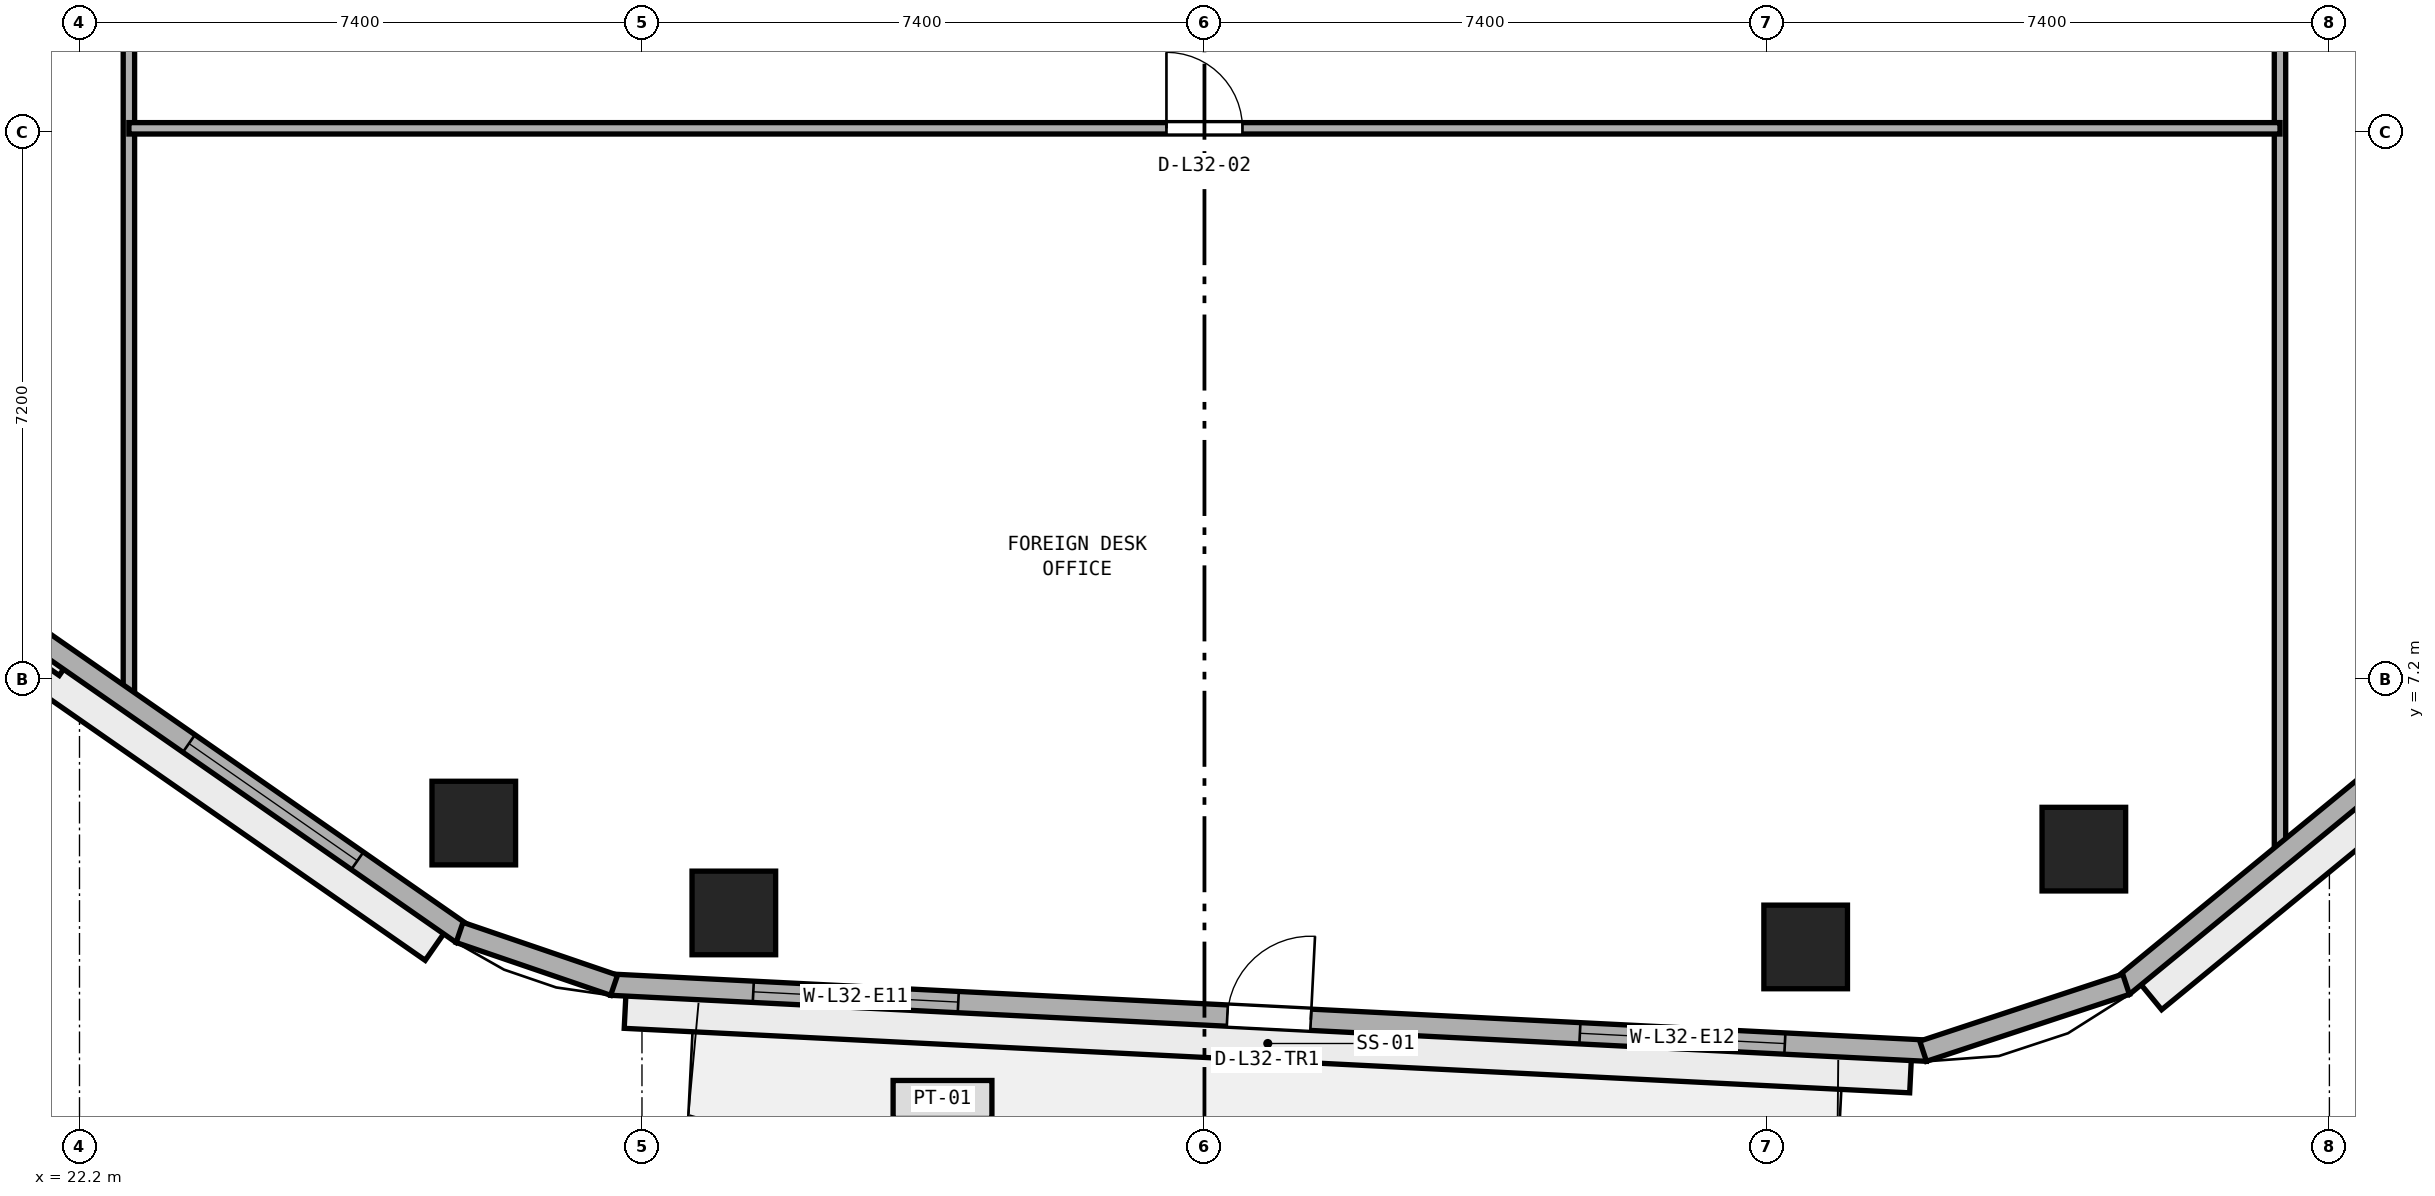
"""IFC4 building model, lengths in metres.
Left out: names, types, materials, properties, quantities, classifications, styles, units other than length and angle.
Written with IfcOpenShell. Run it as: python <this file> out.ifc"""

import sys

from ifc_helpers import new_model, si_unit, direction, frame, frame_2d, origin, origin_2d, place, context, subcontext, project, spatial, rectangle, extrude, element, fill, save


model = new_model("IFC4")
c1 = context("Model", 3, precision=1e-05, world=origin(), true_north=direction((0.0, 1.0)))
c2 = subcontext(c1, "Body", "Model", "MODEL_VIEW")
j1 = project(units=[si_unit("LENGTHUNIT", "METRE"), si_unit("PLANEANGLEUNIT", "RADIAN")], contexts=[c1])
p1 = place(None, origin())
s1 = spatial("IfcSite", under=j1, at=p1, CompositionType="ELEMENT")
p2 = place(p1, origin())
s2 = spatial("IfcBuilding", under=s1, at=p2, CompositionType="ELEMENT")
p3 = place(p2, frame((0.0, 0.0, 128.8)))
s3 = spatial("IfcBuildingStorey", under=s2, at=p3, CompositionType="ELEMENT", Elevation=128.8)
for number, where, z_axis, x_axis in (
    (1, (30.809, 4.127, 0.0), (0.0, 0.0, 1.0), (1.0, 0.0, 0.0)),
    (2, (44.91, 3.68, 0.0), (0.0, 0.0, 1.0), (1.0, 0.0, 0.0)),
    (3, (48.57, 4.967, 0.0), (0.0, 0.0, 1.0), (1.0, 0.0, 0.0)),
    (4, (27.387, 5.31, 0.0), (0.0, 0.0, 1.0), (1.0, 0.0, 0.0)),
):
    element("IfcColumn", number, at=place(p3, frame(where, z_axis=z_axis, x_axis=x_axis)), inside=s3, PredefinedType="COLUMN", context=c2, shape_type="SweptSolid", body=[
        extrude(rectangle(XDim=1.1, YDim=1.1, at=origin_2d()), origin(), (0.0, 0.0, 1.0), 3.8),
    ])
p4 = place(p3, frame((51.15, 4.823, 0.0), z_axis=(0.0, 0.0, 1.0), x_axis=(0.0, 1.0, 0.0)))
e5 = element("IfcWall", 5, at=p4, inside=s3, PredefinedType="PARTITIONING", context=c2, shape_type="SweptSolid", body=[
    extrude(rectangle(XDim=17.978, YDim=0.15, at=frame_2d((8.989, 0.0))), origin(), (0.0, 0.0, 1.0), 3.54),
])
p5 = place(p4, frame((12.952, 0.0, 0.0)))
e6 = element("IfcOpeningElement", 6, at=p5, cuts=e5, PredefinedType="OPENING", context=c2, shape_type="SweptSolid", body=[
    extrude(rectangle(XDim=0.9, YDim=2.1, at=frame_2d((0.45, 1.05))), frame((0.0, 0.085, 0.0), z_axis=(0.0, -1.0, 0.0), x_axis=(1.0, 0.0, 0.0)), (0.0, 0.0, 1.0), 0.17),
])
p6 = place(p3, frame((22.85, 6.875, 0.0), z_axis=(0.0, 0.0, 1.0), x_axis=(0.0, 1.0, 0.0)))
e7 = element("IfcWall", 7, at=p6, inside=s3, PredefinedType="PARTITIONING", context=c2, shape_type="SweptSolid", body=[
    extrude(rectangle(XDim=16.975, YDim=0.15, at=frame_2d((8.487, 0.0))), origin(), (0.0, 0.0, 1.0), 3.54),
])
p7 = place(p6, frame((10.199, 0.0, 0.0)))
e8 = element("IfcOpeningElement", 8, at=p7, cuts=e7, PredefinedType="OPENING", context=c2, shape_type="SweptSolid", body=[
    extrude(rectangle(XDim=1.0, YDim=2.12, at=frame_2d((0.5, 1.06))), frame((0.0, 0.085, 0.0), z_axis=(0.0, -1.0, 0.0), x_axis=(1.0, 0.0, 0.0)), (0.0, 0.0, 1.0), 0.17),
])
p8 = place(p3, frame((22.85, 14.45, 0.0), z_axis=(0.0, 0.0, 1.0), x_axis=(1.0, 0.0, 0.0)))
e9 = element("IfcWall", 9, at=p8, inside=s3, PredefinedType="PARTITIONING", context=c2, shape_type="SweptSolid", body=[
    extrude(rectangle(XDim=28.3, YDim=0.15, at=frame_2d((14.15, 0.0))), origin(), (0.0, 0.0, 1.0), 3.54),
])
p9 = place(p8, frame((13.65, 0.0, 0.0)))
e10 = element("IfcOpeningElement", 10, at=p9, cuts=e9, PredefinedType="OPENING", context=c2, shape_type="SweptSolid", body=[
    extrude(rectangle(XDim=1.0, YDim=2.12, at=frame_2d((0.5, 1.06))), frame((0.0, 0.085, 0.0), z_axis=(0.0, -1.0, 0.0), x_axis=(1.0, 0.0, 0.0)), (0.0, 0.0, 1.0), 0.17),
])
p10 = place(p3, frame((29.195, 3.184, 0.0), z_axis=(0.0, 0.0, 1.0), x_axis=(0.998743400978, -0.05011605535, 0.0)))
e11 = element("IfcWall", 11, at=p10, inside=s3, PredefinedType="STANDARD", context=c2, shape_type="SweptSolid", body=[
    extrude(rectangle(XDim=17.333, YDim=0.28, at=frame_2d((8.667, 0.0))), origin(), (0.0, 0.0, 1.0), 3.54),
])
p11 = place(p10, frame((8.116, 0.0, 0.0)))
e12 = element("IfcOpeningElement", 12, at=p11, cuts=e11, PredefinedType="OPENING", context=c2, shape_type="SweptSolid", body=[
    extrude(rectangle(XDim=1.1, YDim=2.2, at=frame_2d((0.55, 1.1))), frame((0.0, 0.15, 0.0), z_axis=(0.0, -1.0, 0.0), x_axis=(1.0, 0.0, 0.0)), (0.0, 0.0, 1.0), 0.3),
])
p12 = place(p10, frame((1.872, 0.0, 0.9)))
e13 = element("IfcOpeningElement", 13, at=p12, cuts=e11, PredefinedType="OPENING", context=c2, shape_type="SweptSolid", body=[
    extrude(rectangle(XDim=2.7, YDim=1.75, at=frame_2d((1.35, 0.875))), frame((0.0, 0.15, 0.0), z_axis=(0.0, -1.0, 0.0), x_axis=(1.0, 0.0, 0.0)), (0.0, 0.0, 1.0), 0.3),
])
p13 = place(p10, frame((12.76, 0.0, 0.9)))
e14 = element("IfcOpeningElement", 14, at=p13, cuts=e11, PredefinedType="OPENING", context=c2, shape_type="SweptSolid", body=[
    extrude(rectangle(XDim=2.7, YDim=1.75, at=frame_2d((1.35, 0.875))), frame((0.0, 0.15, 0.0), z_axis=(0.0, -1.0, 0.0), x_axis=(1.0, 0.0, 0.0)), (0.0, 0.0, 1.0), 0.3),
])
p14 = place(p3, frame((49.08, 3.164, 0.0), z_axis=(0.0, 0.0, 1.0), x_axis=(0.772937830186, 0.634481765433, 0.0)))
e15 = element("IfcWall", 15, at=p14, inside=s3, PredefinedType="STANDARD", context=c2, shape_type="SweptSolid", body=[
    extrude(rectangle(XDim=16.309, YDim=0.28, at=frame_2d((8.154, 0.0))), origin(), (0.0, 0.0, 1.0), 3.54),
])
p15 = place(p14, frame((6.804, 0.0, 0.9)))
e16 = element("IfcOpeningElement", 16, at=p15, cuts=e15, PredefinedType="OPENING", context=c2, shape_type="SweptSolid", body=[
    extrude(rectangle(XDim=2.7, YDim=1.75, at=frame_2d((1.35, 0.875))), frame((0.0, 0.15, 0.0), z_axis=(0.0, -1.0, 0.0), x_axis=(1.0, 0.0, 0.0)), (0.0, 0.0, 1.0), 0.3),
])
p16 = place(p14, frame((11.907, 0.0, 0.9)))
e17 = element("IfcOpeningElement", 17, at=p16, cuts=e15, PredefinedType="OPENING", context=c2, shape_type="SweptSolid", body=[
    extrude(rectangle(XDim=2.7, YDim=1.75, at=frame_2d((1.35, 0.875))), frame((0.0, 0.15, 0.0), z_axis=(0.0, -1.0, 0.0), x_axis=(1.0, 0.0, 0.0)), (0.0, 0.0, 1.0), 0.3),
])
p17 = place(p3, frame((13.952, 13.101, 0.0), z_axis=(0.0, 0.0, 1.0), x_axis=(0.820698239491, -0.571361881558, 0.0)))
e18 = element("IfcWall", 18, at=p17, inside=s3, PredefinedType="STANDARD", context=c2, shape_type="SweptSolid", body=[
    extrude(rectangle(XDim=16.186, YDim=0.28, at=frame_2d((8.093, 0.0))), origin(), (0.0, 0.0, 1.0), 3.54),
])
p18 = place(p17, frame((1.681, 0.0, 0.9)))
e19 = element("IfcOpeningElement", 19, at=p18, cuts=e18, PredefinedType="OPENING", context=c2, shape_type="SweptSolid", body=[
    extrude(rectangle(XDim=2.7, YDim=1.75, at=frame_2d((1.35, 0.875))), frame((0.0, 0.15, 0.0), z_axis=(0.0, -1.0, 0.0), x_axis=(1.0, 0.0, 0.0)), (0.0, 0.0, 1.0), 0.3),
])
p19 = place(p17, frame((6.743, 0.0, 0.9)))
e20 = element("IfcOpeningElement", 20, at=p19, cuts=e18, PredefinedType="OPENING", context=c2, shape_type="SweptSolid", body=[
    extrude(rectangle(XDim=2.7, YDim=1.75, at=frame_2d((1.35, 0.875))), frame((0.0, 0.15, 0.0), z_axis=(0.0, -1.0, 0.0), x_axis=(1.0, 0.0, 0.0)), (0.0, 0.0, 1.0), 0.3),
])
p20 = place(p17, frame((11.804, 0.0, 0.9)))
e21 = element("IfcOpeningElement", 21, at=p20, cuts=e18, PredefinedType="OPENING", context=c2, shape_type="SweptSolid", body=[
    extrude(rectangle(XDim=2.7, YDim=1.75, at=frame_2d((1.35, 0.875))), frame((0.0, 0.15, 0.0), z_axis=(0.0, -1.0, 0.0), x_axis=(1.0, 0.0, 0.0)), (0.0, 0.0, 1.0), 0.3),
])
p21 = place(p3, frame((46.455, 2.309, 0.0), z_axis=(0.0, 0.0, 1.0), x_axis=(0.949677222099, 0.313230224955, 0.0)))
e22 = element("IfcWall", 22, at=p21, inside=s3, PredefinedType="STANDARD", context=c2, shape_type="SweptSolid", body=[
    extrude(rectangle(XDim=2.811, YDim=0.28, at=frame_2d((1.406, 0.0))), origin(), (0.0, 0.0, 1.0), 3.54),
])
p22 = place(p3, frame((27.2, 3.871, 0.0), z_axis=(0.0, 0.0, 1.0), x_axis=(0.946327814955, -0.323208395068, 0.0)))
e23 = element("IfcWall", 23, at=p22, inside=s3, PredefinedType="STANDARD", context=c2, shape_type="SweptSolid", body=[
    extrude(rectangle(XDim=2.148, YDim=0.28, at=frame_2d((1.074, 0.0))), origin(), (0.0, 0.0, 1.0), 3.54),
])
p23 = place(p9, origin())
e24 = element("IfcDoor", 24, at=p23, inside=s3, OperationType="SINGLE_SWING_LEFT", PredefinedType="DOOR", context=c2, shape_type="SweptSolid", body=[
    extrude(rectangle(XDim=1.0, YDim=2.12, at=frame_2d((0.5, 1.06))), frame((0.0, 0.025, 0.0), z_axis=(0.0, -1.0, 0.0), x_axis=(1.0, 0.0, 0.0)), (0.0, 0.0, 1.0), 0.05),
])
fill(e10, e24)
p24 = place(p11, origin())
e25 = element("IfcDoor", 25, at=p24, inside=s3, OperationType="SINGLE_SWING_RIGHT", PredefinedType="DOOR", context=c2, shape_type="SweptSolid", body=[
    extrude(rectangle(XDim=1.1, YDim=2.2, at=frame_2d((0.55, 1.1))), frame((0.0, 0.025, 0.0), z_axis=(0.0, -1.0, 0.0), x_axis=(1.0, 0.0, 0.0)), (0.0, 0.0, 1.0), 0.05),
])
fill(e12, e25)
p25 = place(p12, origin())
e26 = element("IfcWindow", 26, at=p25, inside=s3, PartitioningType="SINGLE_PANEL", PredefinedType="WINDOW", context=c2, shape_type="SweptSolid", body=[
    extrude(rectangle(XDim=2.7, YDim=1.75, at=frame_2d((1.35, 0.875))), frame((0.0, 0.03, 0.0), z_axis=(0.0, -1.0, 0.0), x_axis=(1.0, 0.0, 0.0)), (0.0, 0.0, 1.0), 0.06),
])
fill(e13, e26)
p26 = place(p13, origin())
e27 = element("IfcWindow", 27, at=p26, inside=s3, PartitioningType="SINGLE_PANEL", PredefinedType="WINDOW", context=c2, shape_type="SweptSolid", body=[
    extrude(rectangle(XDim=2.7, YDim=1.75, at=frame_2d((1.35, 0.875))), frame((0.0, 0.03, 0.0), z_axis=(0.0, -1.0, 0.0), x_axis=(1.0, 0.0, 0.0)), (0.0, 0.0, 1.0), 0.06),
])
fill(e14, e27)
p27 = place(p20, origin())
e28 = element("IfcWindow", 28, at=p27, inside=s3, PartitioningType="SINGLE_PANEL", PredefinedType="WINDOW", context=c2, shape_type="SweptSolid", body=[
    extrude(rectangle(XDim=2.7, YDim=1.75, at=frame_2d((1.35, 0.875))), frame((0.0, 0.03, 0.0), z_axis=(0.0, -1.0, 0.0), x_axis=(1.0, 0.0, 0.0)), (0.0, 0.0, 1.0), 0.06),
])
fill(e21, e28)
save(model, sys.argv[1])
